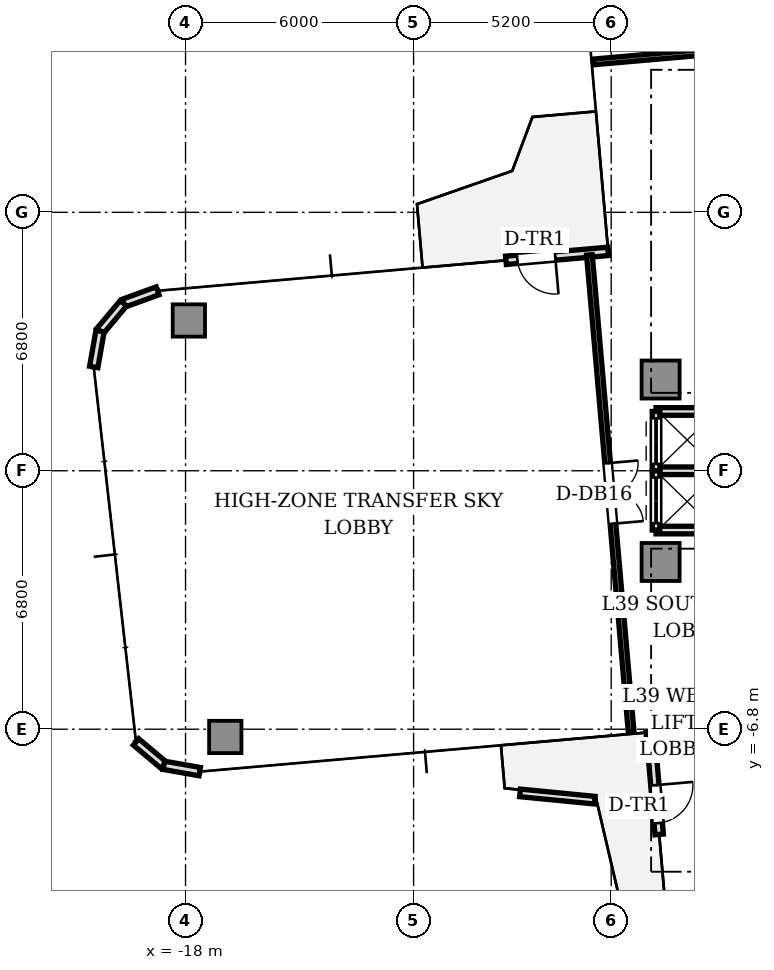
"""IFC4 building model, lengths in metres.
Left out: names, types, materials, properties, quantities, classifications, styles, units other than length and angle.
Written with IfcOpenShell. Run it as: python <this file> out.ifc"""

import sys

from ifc_helpers import new_model, si_unit, direction, frame, frame_2d, origin, origin_2d, place, context, subcontext, project, spatial, rectangle, extrude, source, transform, mapped, element, fill, save


model = new_model("IFC4")
c1 = context("Model", 3, precision=1e-05, world=origin(), true_north=direction((0.0, 1.0)))
c2 = subcontext(c1, "Body", "Model", "MODEL_VIEW")
j1 = project(units=[si_unit("LENGTHUNIT", "METRE"), si_unit("PLANEANGLEUNIT", "RADIAN")], contexts=[c1])
p1 = place(None, origin())
s1 = spatial("IfcSite", under=j1, at=p1, CompositionType="ELEMENT")
p2 = place(p1, origin())
s2 = spatial("IfcBuilding", under=s1, at=p2, CompositionType="ELEMENT")
p3 = place(p2, frame((0.0, 0.0, 142.75)))
s3 = spatial("IfcBuildingStorey", under=s2, at=p3, CompositionType="ELEMENT", Elevation=142.75)
m1 = source(origin(), c2, "Body", "SweptSolid", [
    extrude(rectangle(XDim=1.0, YDim=1.0, at=origin_2d()), origin(), (0.0, 0.0, 1.0), 4.26),
])
for number, where, z_axis, x_axis in (
    (1, (-5.5, 2.4, 0.0), (0.0, 0.0, 1.0), (1.0, 0.0, 0.0)),
    (2, (-5.5, -2.4, 0.0), (0.0, 0.0, 1.0), (1.0, 0.0, 0.0)),
):
    element("IfcColumn", number, at=place(p3, frame(where, z_axis=z_axis, x_axis=x_axis)), inside=s3, PredefinedType="COLUMN", context=c2, shape_type="MappedRepresentation", body=[
        mapped(m1, transform((0.0, 0.0, 0.0), scale=1.0)),
    ])
m2 = source(origin(), c2, "Body", "SweptSolid", [
    extrude(rectangle(XDim=0.85, YDim=0.85, at=origin_2d()), origin(), (0.0, 0.0, 1.0), 4.26),
])
for number, where, z_axis, x_axis in (
    (3, (-17.913, 3.954, 0.0), (0.0, 0.0, 1.0), (1.0, 0.0, 0.0)),
    (4, (-16.954, -7.004, 0.0), (0.0, 0.0, 1.0), (1.0, 0.0, 0.0)),
):
    element("IfcColumn", number, at=place(p3, frame(where, z_axis=z_axis, x_axis=x_axis)), inside=s3, PredefinedType="COLUMN", context=c2, shape_type="MappedRepresentation", body=[
        mapped(m2, transform((0.0, 0.0, 0.0), scale=1.0)),
    ])
p4 = place(p3, frame((-6.879, 5.772, 0.0), z_axis=(0.0, 0.0, 1.0), x_axis=(-0.996193619346, -0.087168071984, 0.0)))
e5 = element("IfcWall", 5, at=p4, inside=s3, PredefinedType="STANDARD", context=c2, shape_type="SweptSolid", body=[
    extrude(rectangle(XDim=2.7, YDim=0.22, at=frame_2d((1.35, 0.0))), origin(), (0.0, 0.0, 1.0), 4.26),
])
p5 = place(p4, frame((1.4, 0.0, 0.0)))
e6 = element("IfcOpeningElement", 6, at=p5, cuts=e5, PredefinedType="OPENING", context=c2, shape_type="SweptSolid", body=[
    extrude(rectangle(XDim=1.0, YDim=2.2, at=frame_2d((0.5, 1.1))), frame((0.0, 0.12, 0.0), z_axis=(0.0, -1.0, 0.0), x_axis=(1.0, 0.0, 0.0)), (0.0, 0.0, 1.0), 0.24),
])
p6 = place(p3, frame((-18.734, 4.735, 0.0), z_axis=(0.0, 0.0, 1.0), x_axis=(-0.939741306239, -0.34188635151, 0.0)))
e7 = element("IfcWall", 7, at=p6, inside=s3, PredefinedType="STANDARD", context=c2, shape_type="SweptSolid", body=[
    extrude(rectangle(XDim=0.958, YDim=0.22, at=frame_2d((0.479, 0.0))), origin(), (0.0, 0.0, 1.0), 4.26),
])
for number, where, z_axis, x_axis in (
    (8, (-19.634, 4.408, 0.0), (0.0, 0.0, 1.0), (-0.643, -0.766, 0.0)),
    (9, (-20.25, 3.674, 0.0), (0.0, 0.0, 1.0), (-0.174, -0.985, 0.0)),
):
    element("IfcWall", number, at=place(p3, frame(where, z_axis=z_axis, x_axis=x_axis)), inside=s3, PredefinedType="STANDARD", context=c2, shape_type="SweptSolid", body=[
        extrude(rectangle(XDim=0.958, YDim=0.22, at=frame_2d((0.479, 0.0))), origin(), (0.0, 0.0, 1.0), 4.26),
    ])
p7 = place(p3, frame((-19.304, -7.135, 0.0), z_axis=(0.0, 0.0, 1.0), x_axis=(0.766001159887, -0.642839189107, 0.0)))
e10 = element("IfcWall", 10, at=p7, inside=s3, PredefinedType="STANDARD", context=c2, shape_type="SweptSolid", body=[
    extrude(rectangle(XDim=0.958, YDim=0.22, at=frame_2d((0.479, 0.0))), origin(), (0.0, 0.0, 1.0), 4.26),
])
p8 = place(p3, frame((-18.57, -7.75, 0.0), z_axis=(0.0, 0.0, 1.0), x_axis=(0.984770724397, -0.173858046606, 0.0)))
e11 = element("IfcWall", 11, at=p8, inside=s3, PredefinedType="STANDARD", context=c2, shape_type="SweptSolid", body=[
    extrude(rectangle(XDim=0.958, YDim=0.22, at=frame_2d((0.479, 0.0))), origin(), (0.0, 0.0, 1.0), 4.26),
])
p9 = place(p3, frame((-5.772, -6.879, 0.0), z_axis=(0.0, 0.0, 1.0), x_axis=(0.087168071984, -0.996193619346, 0.0)))
e12 = element("IfcWall", 12, at=p9, inside=s3, PredefinedType="STANDARD", context=c2, shape_type="SweptSolid", body=[
    extrude(rectangle(XDim=2.7, YDim=0.22, at=frame_2d((1.35, 0.0))), origin(), (0.0, 0.0, 1.0), 4.26),
])
p10 = place(p9, frame((1.4, 0.0, 0.0)))
e13 = element("IfcOpeningElement", 13, at=p10, cuts=e12, PredefinedType="OPENING", context=c2, shape_type="SweptSolid", body=[
    extrude(rectangle(XDim=1.0, YDim=2.2, at=frame_2d((0.5, 1.1))), frame((0.0, 0.12, 0.0), z_axis=(0.0, -1.0, 0.0), x_axis=(1.0, 0.0, 0.0)), (0.0, 0.0, 1.0), 0.24),
])
p11 = place(p3, frame((-9.198, -8.476, 0.0), z_axis=(0.0, 0.0, 1.0), x_axis=(0.995277839455, -0.097067101997, 0.0)))
e14 = element("IfcWall", 14, at=p11, inside=s3, PredefinedType="PARAPET", context=c2, shape_type="SweptSolid", body=[
    extrude(rectangle(XDim=1.974, YDim=0.2, at=frame_2d((0.987, 0.0))), origin(), (0.0, 0.0, 1.0), 0.65),
])
for number, where, z_axis, x_axis in (
    (15, (-5.62, 1.56, 0.0), (0.0, 0.0, 1.0), (1.0, 0.0, 0.0)),
    (16, (-5.62, -1.56, 0.0), (0.0, 0.0, 1.0), (1.0, 0.0, 0.0)),
    (17, (-5.62, 0.0, 0.0), (0.0, 0.0, 1.0), (1.0, 0.0, 0.0)),
):
    element("IfcWall", number, at=place(p3, frame(where, z_axis=z_axis, x_axis=x_axis)), inside=s3, PredefinedType="SOLIDWALL", context=c2, shape_type="SweptSolid", body=[
        extrude(rectangle(XDim=1.64, YDim=0.2, at=frame_2d((0.82, 0.0))), origin(), (0.0, 0.0, 1.0), 3.81),
    ])
p12 = place(p3, frame((-5.62, 0.0, 0.0), z_axis=(0.0, 0.0, 1.0), x_axis=(0.0, 1.0, 0.0)))
e18 = element("IfcWall", 18, at=p12, inside=s3, PredefinedType="SOLIDWALL", context=c2, shape_type="SweptSolid", body=[
    extrude(rectangle(XDim=1.56, YDim=0.2, at=frame_2d((0.78, 0.0))), origin(), (0.0, 0.0, 1.0), 3.81),
])
p13 = place(p12, frame((0.18, 0.0, 0.0)))
e19 = element("IfcOpeningElement", 19, at=p13, cuts=e18, PredefinedType="OPENING", context=c2, shape_type="SweptSolid", body=[
    extrude(rectangle(XDim=1.2, YDim=2.2, at=frame_2d((0.6, 1.1))), frame((0.0, 0.11, 0.0), z_axis=(0.0, -1.0, 0.0), x_axis=(1.0, 0.0, 0.0)), (0.0, 0.0, 1.0), 0.22),
])
p14 = place(p3, frame((-5.62, -1.56, 0.0), z_axis=(0.0, 0.0, 1.0), x_axis=(0.0, 1.0, 0.0)))
e20 = element("IfcWall", 20, at=p14, inside=s3, PredefinedType="SOLIDWALL", context=c2, shape_type="SweptSolid", body=[
    extrude(rectangle(XDim=1.56, YDim=0.2, at=frame_2d((0.78, 0.0))), origin(), (0.0, 0.0, 1.0), 3.81),
])
p15 = place(p14, frame((0.18, 0.0, 0.0)))
e21 = element("IfcOpeningElement", 21, at=p15, cuts=e20, PredefinedType="OPENING", context=c2, shape_type="SweptSolid", body=[
    extrude(rectangle(XDim=1.2, YDim=2.2, at=frame_2d((0.6, 1.1))), frame((0.0, 0.11, 0.0), z_axis=(0.0, -1.0, 0.0), x_axis=(1.0, 0.0, 0.0)), (0.0, 0.0, 1.0), 0.22),
])
p16 = place(p3, frame((5.287, 11.856, 0.0), z_axis=(0.0, 0.0, 1.0), x_axis=(-0.996194790044, -0.087154691724, 0.0)))
e22 = element("IfcWall", 22, at=p16, inside=s3, PredefinedType="PARTITIONING", context=c2, shape_type="SweptSolid", body=[
    extrude(rectangle(XDim=12.6, YDim=0.15, at=frame_2d((6.3, 0.0))), origin(), (0.0, 0.0, 1.0), 3.81),
])
p17 = place(p16, frame((5.5, 0.0, 0.0)))
e23 = element("IfcOpeningElement", 23, at=p17, cuts=e22, PredefinedType="OPENING", context=c2, shape_type="SweptSolid", body=[
    extrude(rectangle(XDim=1.6, YDim=2.25, at=frame_2d((0.8, 1.125))), frame((0.0, 0.085, 0.0), z_axis=(0.0, -1.0, 0.0), x_axis=(1.0, 0.0, 0.0)), (0.0, 0.0, 1.0), 0.17),
])
p18 = place(p3, frame((-7.373, 5.679, 0.0), z_axis=(0.0, 0.0, 1.0), x_axis=(0.087154691724, -0.996194790044, 0.0)))
e24 = element("IfcWall", 24, at=p18, inside=s3, PredefinedType="PARTITIONING", context=c2, shape_type="SweptSolid", body=[
    extrude(rectangle(XDim=12.6, YDim=0.15, at=frame_2d((6.3, 0.0))), origin(), (0.0, 0.0, 1.0), 3.81),
])
p19 = place(p18, frame((5.5, 0.0, 0.0)))
e25 = element("IfcOpeningElement", 25, at=p19, cuts=e24, PredefinedType="OPENING", context=c2, shape_type="SweptSolid", body=[
    extrude(rectangle(XDim=1.6, YDim=2.25, at=frame_2d((0.8, 1.125))), frame((0.0, 0.085, 0.0), z_axis=(0.0, -1.0, 0.0), x_axis=(1.0, 0.0, 0.0)), (0.0, 0.0, 1.0), 0.17),
])
m3 = source(origin(), c2, "Body", "SweptSolid", [
    extrude(rectangle(XDim=1.0, YDim=0.05, at=origin_2d()), origin(), (0.0, 0.0, 1.0), 2.2),
])
p20 = place(p5, frame((0.5, 0.0, 0.0)))
e26 = element("IfcDoor", 26, at=p20, inside=s3, OperationType="SINGLE_SWING_LEFT", PredefinedType="DOOR", context=c2, shape_type="MappedRepresentation", body=[
    mapped(m3, transform((0.0, 0.0, 0.0), scale=1.0)),
])
fill(e6, e26)
p21 = place(p10, frame((0.5, 0.0, 0.0)))
e27 = element("IfcDoor", 27, at=p21, inside=s3, OperationType="SINGLE_SWING_LEFT", PredefinedType="DOOR", context=c2, shape_type="MappedRepresentation", body=[
    mapped(m3, transform((0.0, 0.0, 0.0), scale=1.0)),
])
fill(e13, e27)
m4 = source(origin(), c2, "Body", "SweptSolid", [
    extrude(rectangle(XDim=1.2, YDim=0.05, at=origin_2d()), origin(), (0.0, 0.0, 1.0), 2.2),
])
p22 = place(p13, frame((0.6, 0.0, 0.0)))
e28 = element("IfcDoor", 28, at=p22, inside=s3, OperationType="DOUBLE_DOOR_SLIDING", PredefinedType="DOOR", context=c2, shape_type="MappedRepresentation", body=[
    mapped(m4, transform((0.0, 0.0, 0.0), scale=1.0)),
])
fill(e19, e28)
p23 = place(p15, frame((0.6, 0.0, 0.0)))
e29 = element("IfcDoor", 29, at=p23, inside=s3, OperationType="DOUBLE_DOOR_SLIDING", PredefinedType="DOOR", context=c2, shape_type="MappedRepresentation", body=[
    mapped(m4, transform((0.0, 0.0, 0.0), scale=1.0)),
])
fill(e21, e29)
m5 = source(origin(), c2, "Body", "SweptSolid", [
    extrude(rectangle(XDim=1.6, YDim=0.05, at=origin_2d()), origin(), (0.0, 0.0, 1.0), 2.25),
])
p24 = place(p19, frame((0.8, 0.0, 0.0)))
e30 = element("IfcDoor", 30, at=p24, inside=s3, OperationType="DOUBLE_DOOR_SINGLE_SWING", PredefinedType="DOOR", context=c2, shape_type="MappedRepresentation", body=[
    mapped(m5, transform((0.0, 0.0, 0.0), scale=1.0)),
])
fill(e25, e30)
save(model, sys.argv[1])
